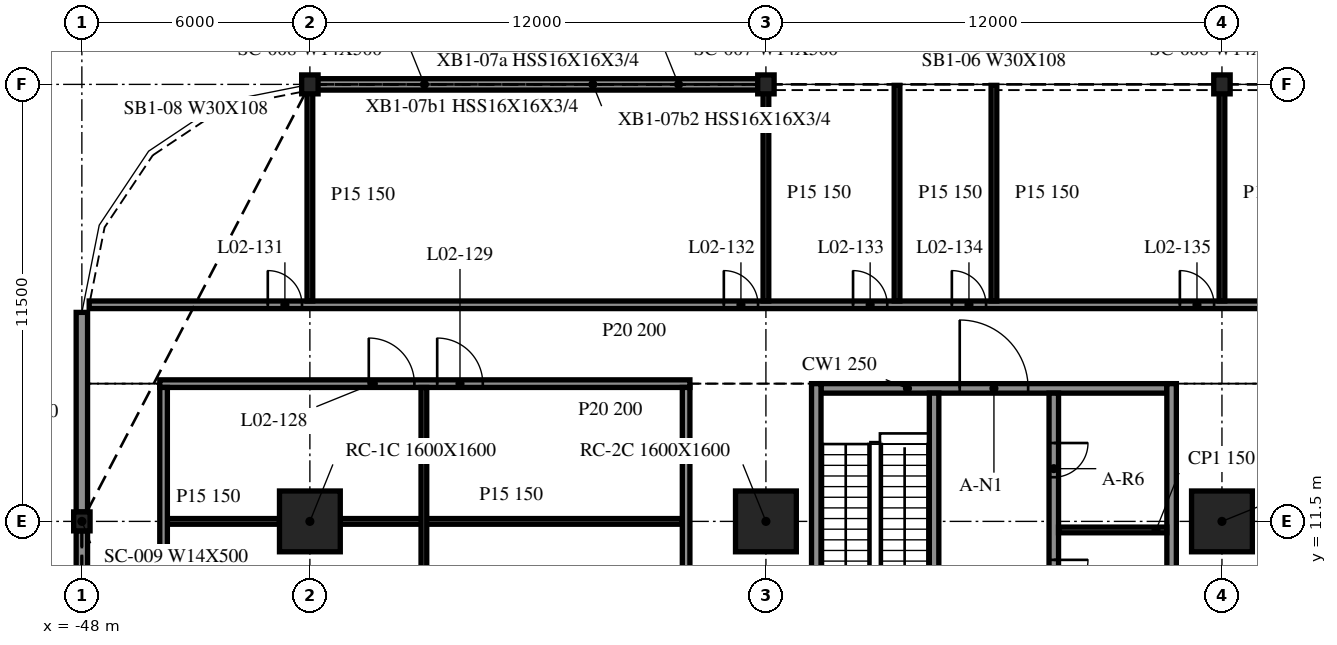
"""IFC4 building model, lengths in metres.
Left out: names, types, materials, properties, quantities, classifications, styles, units other than length and angle.
Written with IfcOpenShell. Run it as: python <this file> out.ifc"""

import sys

from ifc_helpers import new_model, si_unit, direction, frame, frame_2d, origin, origin_2d, place, context, subcontext, project, spatial, rectangle, i_section, extrude, element, fill, save


model = new_model("IFC4")
c1 = context("Model", 3, precision=1e-05, world=origin(), true_north=direction((0.0, 1.0)))
c2 = subcontext(c1, "Body", "Model", "MODEL_VIEW")
j1 = project(units=[si_unit("LENGTHUNIT", "METRE"), si_unit("PLANEANGLEUNIT", "RADIAN")], contexts=[c1])
p1 = place(None, origin())
s1 = spatial("IfcSite", under=j1, at=p1, CompositionType="ELEMENT")
p2 = place(p1, origin())
s2 = spatial("IfcBuilding", under=s1, at=p2, CompositionType="ELEMENT")
p3 = place(p2, frame((0.0, 0.0, 11.5)))
s3 = spatial("IfcBuildingStorey", under=s2, at=p3, CompositionType="ELEMENT", Elevation=11.5)
for number, where, z_axis, x_axis in (
    (1, (-42.0, 11.5, -0.34), (0.0, 0.0, 1.0), (1.0, 0.0, 0.0)),
    (2, (-30.0, 11.5, -0.34), (0.0, 0.0, 1.0), (1.0, 0.0, 0.0)),
    (3, (-18.0, 11.5, -0.34), (0.0, 0.0, 1.0), (1.0, 0.0, 0.0)),
):
    element("IfcColumn", number, at=place(p3, frame(where, z_axis=z_axis, x_axis=x_axis)), inside=s3, PredefinedType="COLUMN", context=c2, shape_type="SweptSolid", body=[
        extrude(rectangle(XDim=1.6, YDim=1.6, at=origin_2d()), origin(), (0.0, 0.0, 1.0), 4.3),
    ])
for number, where, z_axis, x_axis in (
    (4, (-18.0, 23.0, -0.34), (0.0, 0.0, 1.0), (1.0, 0.0, 0.0)),
    (5, (-30.0, 23.0, -0.34), (0.0, 0.0, 1.0), (1.0, 0.0, 0.0)),
    (6, (-42.0, 23.0, -0.34), (0.0, 0.0, 1.0), (1.0, 0.0, 0.0)),
    (7, (-48.0, 11.5, -0.34), (0.0, 0.0, 1.0), (1.0, 0.0, 0.0)),
):
    element("IfcColumn", number, at=place(p3, frame(where, z_axis=z_axis, x_axis=x_axis)), inside=s3, PredefinedType="COLUMN", context=c2, shape_type="SweptSolid", body=[
        extrude(i_section(OverallWidth=0.432, OverallDepth=0.498, WebThickness=0.056, FlangeThickness=0.089, at=origin_2d()), origin(), (0.0, 0.0, 1.0), 4.3),
    ])
p4 = place(p3, frame((-30.028, 23.0, 0.0), z_axis=(0.0, 0.0, 1.0), x_axis=(-1.0, 0.0, 0.0)))
e8 = element("IfcWall", 8, at=p4, inside=s3, PredefinedType="NOTDEFINED", context=c2, shape_type="SweptSolid", body=[
    extrude(rectangle(XDim=11.944, YDim=0.3, at=frame_2d((5.972, 0.0))), origin(), (0.0, 0.0, 1.0), 3.203),
])
p5 = place(p3, frame((-48.0, 17.0, 0.0), z_axis=(0.0, 0.0, 1.0), x_axis=(0.0, -1.0, 0.0)))
e9 = element("IfcWall", 9, at=p5, inside=s3, PredefinedType="NOTDEFINED", context=c2, shape_type="SweptSolid", body=[
    extrude(rectangle(XDim=5.251, YDim=0.3, at=frame_2d((2.625, 0.0))), origin(), (0.0, 0.0, 1.0), 3.203),
])
p6 = place(p3, frame((-48.0, 11.251, 0.0), z_axis=(0.0, 0.0, 1.0), x_axis=(0.0, -1.0, 0.0)))
e10 = element("IfcWall", 10, at=p6, inside=s3, PredefinedType="NOTDEFINED", context=c2, shape_type="SweptSolid", body=[
    extrude(rectangle(XDim=11.002, YDim=0.3, at=frame_2d((5.501, 0.0))), origin(), (0.0, 0.0, 1.0), 3.203),
])
for number, where, z_axis, x_axis in (
    (11, (-28.675, 15.125, 0.0), (0.0, 0.0, 1.0), (0.0, -1.0, 0.0)),
    (12, (-19.325, -9.125, 0.0), (0.0, 0.0, 1.0), (0.0, 1.0, 0.0)),
):
    element("IfcWall", number, at=place(p3, frame(where, z_axis=z_axis, x_axis=x_axis)), inside=s3, PredefinedType="SOLIDWALL", context=c2, shape_type="SweptSolid", body=[
        extrude(rectangle(XDim=24.25, YDim=0.25, at=frame_2d((12.125, 0.0))), origin(), (0.0, 0.0, 1.0), 3.96),
    ])
p7 = place(p3, frame((-28.55, 15.0, 0.0), z_axis=(0.0, 0.0, 1.0), x_axis=(1.0, 0.0, 0.0)))
e13 = element("IfcWall", 13, at=p7, inside=s3, PredefinedType="SOLIDWALL", context=c2, shape_type="SweptSolid", body=[
    extrude(rectangle(XDim=9.1, YDim=0.25, at=frame_2d((4.55, 0.0))), origin(), (0.0, 0.0, 1.0), 3.96),
])
p8 = place(p7, frame((3.65, 0.0, 0.0)))
e14 = element("IfcOpeningElement", 14, at=p8, cuts=e13, PredefinedType="OPENING", context=c2, shape_type="SweptSolid", body=[
    extrude(rectangle(XDim=1.8, YDim=2.1, at=frame_2d((0.9, 1.05))), frame((0.0, 0.135, 0.0), z_axis=(0.0, -1.0, 0.0), x_axis=(1.0, 0.0, 0.0)), (0.0, 0.0, 1.0), 0.27),
])
p9 = place(p3, frame((-25.575, 14.875, 0.0), z_axis=(0.0, 0.0, 1.0), x_axis=(0.0, -1.0, 0.0)))
e15 = element("IfcWall", 15, at=p9, inside=s3, PredefinedType="SOLIDWALL", context=c2, shape_type="SweptSolid", body=[
    extrude(rectangle(XDim=6.25, YDim=0.25, at=frame_2d((3.125, 0.0))), origin(), (0.0, 0.0, 1.0), 3.96),
])
p10 = place(p9, frame((4.85, 0.0, 0.0)))
e16 = element("IfcOpeningElement", 16, at=p10, cuts=e15, PredefinedType="OPENING", context=c2, shape_type="SweptSolid", body=[
    extrude(rectangle(XDim=1.0, YDim=2.1, at=frame_2d((0.5, 1.05))), frame((0.0, 0.135, 0.0), z_axis=(0.0, -1.0, 0.0), x_axis=(1.0, 0.0, 0.0)), (0.0, 0.0, 1.0), 0.27),
])
p11 = place(p3, frame((-22.425, 14.875, 0.0), z_axis=(0.0, 0.0, 1.0), x_axis=(0.0, -1.0, 0.0)))
e17 = element("IfcWall", 17, at=p11, inside=s3, PredefinedType="SOLIDWALL", context=c2, shape_type="SweptSolid", body=[
    extrude(rectangle(XDim=23.75, YDim=0.25, at=frame_2d((11.875, 0.0))), origin(), (0.0, 0.0, 1.0), 3.96),
])
p12 = place(p11, frame((15.45, 0.0, 0.0)))
e18 = element("IfcOpeningElement", 18, at=p12, cuts=e17, PredefinedType="OPENING", context=c2, shape_type="SweptSolid", body=[
    extrude(rectangle(XDim=1.1, YDim=2.1, at=frame_2d((0.55, 1.05))), frame((0.0, 0.135, 0.0), z_axis=(0.0, -1.0, 0.0), x_axis=(1.0, 0.0, 0.0)), (0.0, 0.0, 1.0), 0.27),
])
p13 = place(p11, frame((12.7, 0.0, 0.0)))
e19 = element("IfcOpeningElement", 19, at=p13, cuts=e17, PredefinedType="OPENING", context=c2, shape_type="SweptSolid", body=[
    extrude(rectangle(XDim=1.1, YDim=2.1, at=frame_2d((0.55, 1.05))), frame((0.0, 0.135, 0.0), z_axis=(0.0, -1.0, 0.0), x_axis=(1.0, 0.0, 0.0)), (0.0, 0.0, 1.0), 0.27),
])
p14 = place(p11, frame((21.337, 0.0, 0.0)))
e20 = element("IfcOpeningElement", 20, at=p14, cuts=e17, PredefinedType="OPENING", context=c2, shape_type="SweptSolid", body=[
    extrude(rectangle(XDim=0.9, YDim=2.1, at=frame_2d((0.45, 1.05))), frame((0.0, 0.135, 0.0), z_axis=(0.0, -1.0, 0.0), x_axis=(1.0, 0.0, 0.0)), (0.0, 0.0, 1.0), 0.27),
])
p15 = place(p11, frame((18.262, 0.0, 0.0)))
e21 = element("IfcOpeningElement", 21, at=p15, cuts=e17, PredefinedType="OPENING", context=c2, shape_type="SweptSolid", body=[
    extrude(rectangle(XDim=0.9, YDim=2.1, at=frame_2d((0.45, 1.05))), frame((0.0, 0.135, 0.0), z_axis=(0.0, -1.0, 0.0), x_axis=(1.0, 0.0, 0.0)), (0.0, 0.0, 1.0), 0.27),
])
p16 = place(p11, frame((4.387, 0.0, 0.0)))
e22 = element("IfcOpeningElement", 22, at=p16, cuts=e17, PredefinedType="OPENING", context=c2, shape_type="SweptSolid", body=[
    extrude(rectangle(XDim=0.9, YDim=2.1, at=frame_2d((0.45, 1.05))), frame((0.0, 0.135, 0.0), z_axis=(0.0, -1.0, 0.0), x_axis=(1.0, 0.0, 0.0)), (0.0, 0.0, 1.0), 0.27),
])
p17 = place(p11, frame((1.312, 0.0, 0.0)))
e23 = element("IfcOpeningElement", 23, at=p17, cuts=e17, PredefinedType="OPENING", context=c2, shape_type="SweptSolid", body=[
    extrude(rectangle(XDim=0.9, YDim=2.1, at=frame_2d((0.45, 1.05))), frame((0.0, 0.135, 0.0), z_axis=(0.0, -1.0, 0.0), x_axis=(1.0, 0.0, 0.0)), (0.0, 0.0, 1.0), 0.27),
])
p18 = place(p3, frame((-22.3, 11.275, 0.0), z_axis=(0.0, 0.0, 1.0), x_axis=(1.0, 0.0, 0.0)))
e24 = element("IfcWall", 24, at=p18, inside=s3, PredefinedType="PARTITIONING", context=c2, shape_type="SweptSolid", body=[
    extrude(rectangle(XDim=2.85, YDim=0.15, at=frame_2d((1.425, 0.0))), origin(), (0.0, 0.0, 1.0), 3.96),
])
p19 = place(p3, frame((-45.75, 11.5, 0.0), z_axis=(0.0, 0.0, 1.0), x_axis=(1.0, 0.0, 0.0)))
e25 = element("IfcWall", 25, at=p19, inside=s3, PredefinedType="PARTITIONING", context=c2, shape_type="SweptSolid", body=[
    extrude(rectangle(XDim=2.95, YDim=0.15, at=frame_2d((1.475, 0.0))), origin(), (0.0, 0.0, 1.0), 3.96),
])
p20 = place(p3, frame((-41.2, 11.5, 0.0), z_axis=(0.0, 0.0, 1.0), x_axis=(1.0, 0.0, 0.0)))
e26 = element("IfcWall", 26, at=p20, inside=s3, PredefinedType="PARTITIONING", context=c2, shape_type="SweptSolid", body=[
    extrude(rectangle(XDim=9.0, YDim=0.15, at=frame_2d((4.5, 0.0))), origin(), (0.0, 0.0, 1.0), 3.96),
])
p21 = place(p3, frame((-45.95, 15.125, 0.0), z_axis=(0.0, 0.0, 1.0), x_axis=(1.0, 0.0, 0.0)))
e27 = element("IfcWall", 27, at=p21, inside=s3, PredefinedType="PARTITIONING", context=c2, shape_type="SweptSolid", body=[
    extrude(rectangle(XDim=13.95, YDim=0.2, at=frame_2d((6.975, 0.0))), origin(), (0.0, 0.0, 1.0), 3.96),
])
p22 = place(p21, frame((5.5, 0.0, 0.0)))
e28 = element("IfcOpeningElement", 28, at=p22, cuts=e27, PredefinedType="OPENING", context=c2, shape_type="SweptSolid", body=[
    extrude(rectangle(XDim=1.2, YDim=2.1, at=frame_2d((0.6, 1.05))), frame((0.0, 0.11, 0.0), z_axis=(0.0, -1.0, 0.0), x_axis=(1.0, 0.0, 0.0)), (0.0, 0.0, 1.0), 0.22),
])
p23 = place(p21, frame((7.3, 0.0, 0.0)))
e29 = element("IfcOpeningElement", 29, at=p23, cuts=e27, PredefinedType="OPENING", context=c2, shape_type="SweptSolid", body=[
    extrude(rectangle(XDim=1.2, YDim=2.1, at=frame_2d((0.6, 1.05))), frame((0.0, 0.11, 0.0), z_axis=(0.0, -1.0, 0.0), x_axis=(1.0, 0.0, 0.0)), (0.0, 0.0, 1.0), 0.22),
])
p24 = place(p3, frame((-47.807, 17.2, 0.0), z_axis=(0.0, 0.0, 1.0), x_axis=(1.0, 0.0, 0.0)))
e30 = element("IfcWall", 30, at=p24, inside=s3, PredefinedType="PARTITIONING", context=c2, shape_type="SweptSolid", body=[
    extrude(rectangle(XDim=95.615, YDim=0.2, at=frame_2d((47.807, 0.0))), origin(), (0.0, 0.0, 1.0), 3.96),
])
p25 = place(p24, frame((4.7, 0.0, 0.0)))
e31 = element("IfcOpeningElement", 31, at=p25, cuts=e30, PredefinedType="OPENING", context=c2, shape_type="SweptSolid", body=[
    extrude(rectangle(XDim=0.9, YDim=2.1, at=frame_2d((0.45, 1.05))), frame((0.0, 0.11, 0.0), z_axis=(0.0, -1.0, 0.0), x_axis=(1.0, 0.0, 0.0)), (0.0, 0.0, 1.0), 0.22),
])
p26 = place(p24, frame((16.7, 0.0, 0.0)))
e32 = element("IfcOpeningElement", 32, at=p26, cuts=e30, PredefinedType="OPENING", context=c2, shape_type="SweptSolid", body=[
    extrude(rectangle(XDim=0.9, YDim=2.1, at=frame_2d((0.45, 1.05))), frame((0.0, 0.11, 0.0), z_axis=(0.0, -1.0, 0.0), x_axis=(1.0, 0.0, 0.0)), (0.0, 0.0, 1.0), 0.22),
])
p27 = place(p24, frame((20.1, 0.0, 0.0)))
e33 = element("IfcOpeningElement", 33, at=p27, cuts=e30, PredefinedType="OPENING", context=c2, shape_type="SweptSolid", body=[
    extrude(rectangle(XDim=0.9, YDim=2.1, at=frame_2d((0.45, 1.05))), frame((0.0, 0.11, 0.0), z_axis=(0.0, -1.0, 0.0), x_axis=(1.0, 0.0, 0.0)), (0.0, 0.0, 1.0), 0.22),
])
p28 = place(p24, frame((22.7, 0.0, 0.0)))
e34 = element("IfcOpeningElement", 34, at=p28, cuts=e30, PredefinedType="OPENING", context=c2, shape_type="SweptSolid", body=[
    extrude(rectangle(XDim=0.9, YDim=2.1, at=frame_2d((0.45, 1.05))), frame((0.0, 0.11, 0.0), z_axis=(0.0, -1.0, 0.0), x_axis=(1.0, 0.0, 0.0)), (0.0, 0.0, 1.0), 0.22),
])
p29 = place(p24, frame((28.7, 0.0, 0.0)))
e35 = element("IfcOpeningElement", 35, at=p29, cuts=e30, PredefinedType="OPENING", context=c2, shape_type="SweptSolid", body=[
    extrude(rectangle(XDim=0.9, YDim=2.1, at=frame_2d((0.45, 1.05))), frame((0.0, 0.11, 0.0), z_axis=(0.0, -1.0, 0.0), x_axis=(1.0, 0.0, 0.0)), (0.0, 0.0, 1.0), 0.22),
])
p30 = place(p24, frame((40.7, 0.0, 0.0)))
e36 = element("IfcOpeningElement", 36, at=p30, cuts=e30, PredefinedType="OPENING", context=c2, shape_type="SweptSolid", body=[
    extrude(rectangle(XDim=0.9, YDim=2.1, at=frame_2d((0.45, 1.05))), frame((0.0, 0.11, 0.0), z_axis=(0.0, -1.0, 0.0), x_axis=(1.0, 0.0, 0.0)), (0.0, 0.0, 1.0), 0.22),
])
p31 = place(p24, frame((44.1, 0.0, 0.0)))
e37 = element("IfcOpeningElement", 37, at=p31, cuts=e30, PredefinedType="OPENING", context=c2, shape_type="SweptSolid", body=[
    extrude(rectangle(XDim=0.9, YDim=2.1, at=frame_2d((0.45, 1.05))), frame((0.0, 0.11, 0.0), z_axis=(0.0, -1.0, 0.0), x_axis=(1.0, 0.0, 0.0)), (0.0, 0.0, 1.0), 0.22),
])
p32 = place(p24, frame((46.7, 0.0, 0.0)))
e38 = element("IfcOpeningElement", 38, at=p32, cuts=e30, PredefinedType="OPENING", context=c2, shape_type="SweptSolid", body=[
    extrude(rectangle(XDim=0.9, YDim=2.1, at=frame_2d((0.45, 1.05))), frame((0.0, 0.11, 0.0), z_axis=(0.0, -1.0, 0.0), x_axis=(1.0, 0.0, 0.0)), (0.0, 0.0, 1.0), 0.22),
])
p33 = place(p24, frame((48.1, 0.0, 0.0)))
e39 = element("IfcOpeningElement", 39, at=p33, cuts=e30, PredefinedType="OPENING", context=c2, shape_type="SweptSolid", body=[
    extrude(rectangle(XDim=0.9, YDim=2.1, at=frame_2d((0.45, 1.05))), frame((0.0, 0.11, 0.0), z_axis=(0.0, -1.0, 0.0), x_axis=(1.0, 0.0, 0.0)), (0.0, 0.0, 1.0), 0.22),
])
p34 = place(p24, frame((54.1, 0.0, 0.0)))
e40 = element("IfcOpeningElement", 40, at=p34, cuts=e30, PredefinedType="OPENING", context=c2, shape_type="SweptSolid", body=[
    extrude(rectangle(XDim=0.9, YDim=2.1, at=frame_2d((0.45, 1.05))), frame((0.0, 0.11, 0.0), z_axis=(0.0, -1.0, 0.0), x_axis=(1.0, 0.0, 0.0)), (0.0, 0.0, 1.0), 0.22),
])
p35 = place(p24, frame((66.1, 0.0, 0.0)))
e41 = element("IfcOpeningElement", 41, at=p35, cuts=e30, PredefinedType="OPENING", context=c2, shape_type="SweptSolid", body=[
    extrude(rectangle(XDim=0.9, YDim=2.1, at=frame_2d((0.45, 1.05))), frame((0.0, 0.11, 0.0), z_axis=(0.0, -1.0, 0.0), x_axis=(1.0, 0.0, 0.0)), (0.0, 0.0, 1.0), 0.22),
])
p36 = place(p24, frame((69.5, 0.0, 0.0)))
e42 = element("IfcOpeningElement", 42, at=p36, cuts=e30, PredefinedType="OPENING", context=c2, shape_type="SweptSolid", body=[
    extrude(rectangle(XDim=0.9, YDim=2.1, at=frame_2d((0.45, 1.05))), frame((0.0, 0.11, 0.0), z_axis=(0.0, -1.0, 0.0), x_axis=(1.0, 0.0, 0.0)), (0.0, 0.0, 1.0), 0.22),
])
p37 = place(p24, frame((72.1, 0.0, 0.0)))
e43 = element("IfcOpeningElement", 43, at=p37, cuts=e30, PredefinedType="OPENING", context=c2, shape_type="SweptSolid", body=[
    extrude(rectangle(XDim=0.9, YDim=2.1, at=frame_2d((0.45, 1.05))), frame((0.0, 0.11, 0.0), z_axis=(0.0, -1.0, 0.0), x_axis=(1.0, 0.0, 0.0)), (0.0, 0.0, 1.0), 0.22),
])
p38 = place(p24, frame((78.1, 0.0, 0.0)))
e44 = element("IfcOpeningElement", 44, at=p38, cuts=e30, PredefinedType="OPENING", context=c2, shape_type="SweptSolid", body=[
    extrude(rectangle(XDim=0.9, YDim=2.1, at=frame_2d((0.45, 1.05))), frame((0.0, 0.11, 0.0), z_axis=(0.0, -1.0, 0.0), x_axis=(1.0, 0.0, 0.0)), (0.0, 0.0, 1.0), 0.22),
])
p39 = place(p24, frame((90.1, 0.0, 0.0)))
e45 = element("IfcOpeningElement", 45, at=p39, cuts=e30, PredefinedType="OPENING", context=c2, shape_type="SweptSolid", body=[
    extrude(rectangle(XDim=0.9, YDim=2.1, at=frame_2d((0.45, 1.05))), frame((0.0, 0.11, 0.0), z_axis=(0.0, -1.0, 0.0), x_axis=(1.0, 0.0, 0.0)), (0.0, 0.0, 1.0), 0.22),
])
p40 = place(p3, frame((-45.85, -9.025, 0.0), z_axis=(0.0, 0.0, 1.0), x_axis=(0.0, 1.0, 0.0)))
e46 = element("IfcWall", 46, at=p40, inside=s3, PredefinedType="PARTITIONING", context=c2, shape_type="SweptSolid", body=[
    extrude(rectangle(XDim=24.05, YDim=0.2, at=frame_2d((12.025, 0.0))), origin(), (0.0, 0.0, 1.0), 3.96),
])
p41 = place(p40, frame((11.5, 0.0, 0.0)))
e47 = element("IfcOpeningElement", 47, at=p41, cuts=e46, PredefinedType="OPENING", context=c2, shape_type="SweptSolid", body=[
    extrude(rectangle(XDim=1.2, YDim=2.1, at=frame_2d((0.6, 1.05))), frame((0.0, 0.11, 0.0), z_axis=(0.0, -1.0, 0.0), x_axis=(1.0, 0.0, 0.0)), (0.0, 0.0, 1.0), 0.22),
])
p42 = place(p3, frame((-42.0, 17.3, 0.0), z_axis=(0.0, 0.0, 1.0), x_axis=(0.0, 1.0, 0.0)))
e48 = element("IfcWall", 48, at=p42, inside=s3, PredefinedType="PARTITIONING", context=c2, shape_type="SweptSolid", body=[
    extrude(rectangle(XDim=5.547, YDim=0.15, at=frame_2d((2.773, 0.0))), origin(), (0.0, 0.0, 1.0), 3.96),
])
p43 = place(p3, frame((-39.0, -9.025, 0.0), z_axis=(0.0, 0.0, 1.0), x_axis=(0.0, 1.0, 0.0)))
e49 = element("IfcWall", 49, at=p43, inside=s3, PredefinedType="PARTITIONING", context=c2, shape_type="SweptSolid", body=[
    extrude(rectangle(XDim=24.05, YDim=0.15, at=frame_2d((12.025, 0.0))), origin(), (0.0, 0.0, 1.0), 3.96),
])
p44 = place(p3, frame((-32.1, -9.025, 0.0), z_axis=(0.0, 0.0, 1.0), x_axis=(0.0, 1.0, 0.0)))
e50 = element("IfcWall", 50, at=p44, inside=s3, PredefinedType="PARTITIONING", context=c2, shape_type="SweptSolid", body=[
    extrude(rectangle(XDim=24.05, YDim=0.2, at=frame_2d((12.025, 0.0))), origin(), (0.0, 0.0, 1.0), 3.96),
])
p45 = place(p44, frame((11.5, 0.0, 0.0)))
e51 = element("IfcOpeningElement", 51, at=p45, cuts=e50, PredefinedType="OPENING", context=c2, shape_type="SweptSolid", body=[
    extrude(rectangle(XDim=1.2, YDim=2.1, at=frame_2d((0.6, 1.05))), frame((0.0, 0.11, 0.0), z_axis=(0.0, -1.0, 0.0), x_axis=(1.0, 0.0, 0.0)), (0.0, 0.0, 1.0), 0.22),
])
for number, where, z_axis, x_axis in (
    (52, (-30.0, 17.3, 0.0), (0.0, 0.0, 1.0), (0.0, 1.0, 0.0)),
    (53, (-26.55, 17.3, 0.0), (0.0, 0.0, 1.0), (0.0, 1.0, 0.0)),
    (54, (-24.0, 17.3, 0.0), (0.0, 0.0, 1.0), (0.0, 1.0, 0.0)),
    (55, (-18.0, 17.3, 0.0), (0.0, 0.0, 1.0), (0.0, 1.0, 0.0)),
):
    element("IfcWall", number, at=place(p3, frame(where, z_axis=z_axis, x_axis=x_axis)), inside=s3, PredefinedType="PARTITIONING", context=c2, shape_type="SweptSolid", body=[
        extrude(rectangle(XDim=5.675, YDim=0.15, at=frame_2d((2.837, 0.0))), origin(), (0.0, 0.0, 1.0), 3.96),
    ])
p46 = place(p8, origin())
e56 = element("IfcDoor", 56, at=p46, inside=s3, OperationType="DOUBLE_DOOR_SINGLE_SWING", PredefinedType="DOOR", context=c2, shape_type="SweptSolid", body=[
    extrude(rectangle(XDim=1.8, YDim=2.1, at=frame_2d((0.9, 1.05))), frame((0.0, 0.025, 0.0), z_axis=(0.0, -1.0, 0.0), x_axis=(1.0, 0.0, 0.0)), (0.0, 0.0, 1.0), 0.05),
])
fill(e14, e56)
p47 = place(p16, origin())
e57 = element("IfcDoor", 57, at=p47, inside=s3, OperationType="SINGLE_SWING_LEFT", PredefinedType="DOOR", context=c2, shape_type="SweptSolid", body=[
    extrude(rectangle(XDim=0.9, YDim=2.1, at=frame_2d((0.45, 1.05))), frame((0.0, 0.025, 0.0), z_axis=(0.0, -1.0, 0.0), x_axis=(1.0, 0.0, 0.0)), (0.0, 0.0, 1.0), 0.05),
])
fill(e22, e57)
p48 = place(p17, origin())
e58 = element("IfcDoor", 58, at=p48, inside=s3, OperationType="SINGLE_SWING_RIGHT", PredefinedType="DOOR", context=c2, shape_type="SweptSolid", body=[
    extrude(rectangle(XDim=0.9, YDim=2.1, at=frame_2d((0.45, 1.05))), frame((0.0, 0.025, 0.0), z_axis=(0.0, -1.0, 0.0), x_axis=(1.0, 0.0, 0.0)), (0.0, 0.0, 1.0), 0.05),
])
fill(e23, e58)
p49 = place(p22, origin())
e59 = element("IfcDoor", 59, at=p49, inside=s3, OperationType="SINGLE_SWING_RIGHT", PredefinedType="DOOR", context=c2, shape_type="SweptSolid", body=[
    extrude(rectangle(XDim=1.2, YDim=2.1, at=frame_2d((0.6, 1.05))), frame((0.0, 0.025, 0.0), z_axis=(0.0, -1.0, 0.0), x_axis=(1.0, 0.0, 0.0)), (0.0, 0.0, 1.0), 0.05),
])
fill(e28, e59)
p50 = place(p23, origin())
e60 = element("IfcDoor", 60, at=p50, inside=s3, OperationType="SINGLE_SWING_LEFT", PredefinedType="DOOR", context=c2, shape_type="SweptSolid", body=[
    extrude(rectangle(XDim=1.2, YDim=2.1, at=frame_2d((0.6, 1.05))), frame((0.0, 0.025, 0.0), z_axis=(0.0, -1.0, 0.0), x_axis=(1.0, 0.0, 0.0)), (0.0, 0.0, 1.0), 0.05),
])
fill(e29, e60)
p51 = place(p25, origin())
e61 = element("IfcDoor", 61, at=p51, inside=s3, OperationType="SINGLE_SWING_LEFT", PredefinedType="DOOR", context=c2, shape_type="SweptSolid", body=[
    extrude(rectangle(XDim=0.9, YDim=2.1, at=frame_2d((0.45, 1.05))), frame((0.0, 0.025, 0.0), z_axis=(0.0, -1.0, 0.0), x_axis=(1.0, 0.0, 0.0)), (0.0, 0.0, 1.0), 0.05),
])
fill(e31, e61)
p52 = place(p26, origin())
e62 = element("IfcDoor", 62, at=p52, inside=s3, OperationType="SINGLE_SWING_LEFT", PredefinedType="DOOR", context=c2, shape_type="SweptSolid", body=[
    extrude(rectangle(XDim=0.9, YDim=2.1, at=frame_2d((0.45, 1.05))), frame((0.0, 0.025, 0.0), z_axis=(0.0, -1.0, 0.0), x_axis=(1.0, 0.0, 0.0)), (0.0, 0.0, 1.0), 0.05),
])
fill(e32, e62)
p53 = place(p27, origin())
e63 = element("IfcDoor", 63, at=p53, inside=s3, OperationType="SINGLE_SWING_LEFT", PredefinedType="DOOR", context=c2, shape_type="SweptSolid", body=[
    extrude(rectangle(XDim=0.9, YDim=2.1, at=frame_2d((0.45, 1.05))), frame((0.0, 0.025, 0.0), z_axis=(0.0, -1.0, 0.0), x_axis=(1.0, 0.0, 0.0)), (0.0, 0.0, 1.0), 0.05),
])
fill(e33, e63)
p54 = place(p28, origin())
e64 = element("IfcDoor", 64, at=p54, inside=s3, OperationType="SINGLE_SWING_LEFT", PredefinedType="DOOR", context=c2, shape_type="SweptSolid", body=[
    extrude(rectangle(XDim=0.9, YDim=2.1, at=frame_2d((0.45, 1.05))), frame((0.0, 0.025, 0.0), z_axis=(0.0, -1.0, 0.0), x_axis=(1.0, 0.0, 0.0)), (0.0, 0.0, 1.0), 0.05),
])
fill(e34, e64)
p55 = place(p29, origin())
e65 = element("IfcDoor", 65, at=p55, inside=s3, OperationType="SINGLE_SWING_LEFT", PredefinedType="DOOR", context=c2, shape_type="SweptSolid", body=[
    extrude(rectangle(XDim=0.9, YDim=2.1, at=frame_2d((0.45, 1.05))), frame((0.0, 0.025, 0.0), z_axis=(0.0, -1.0, 0.0), x_axis=(1.0, 0.0, 0.0)), (0.0, 0.0, 1.0), 0.05),
])
fill(e35, e65)
save(model, sys.argv[1])
